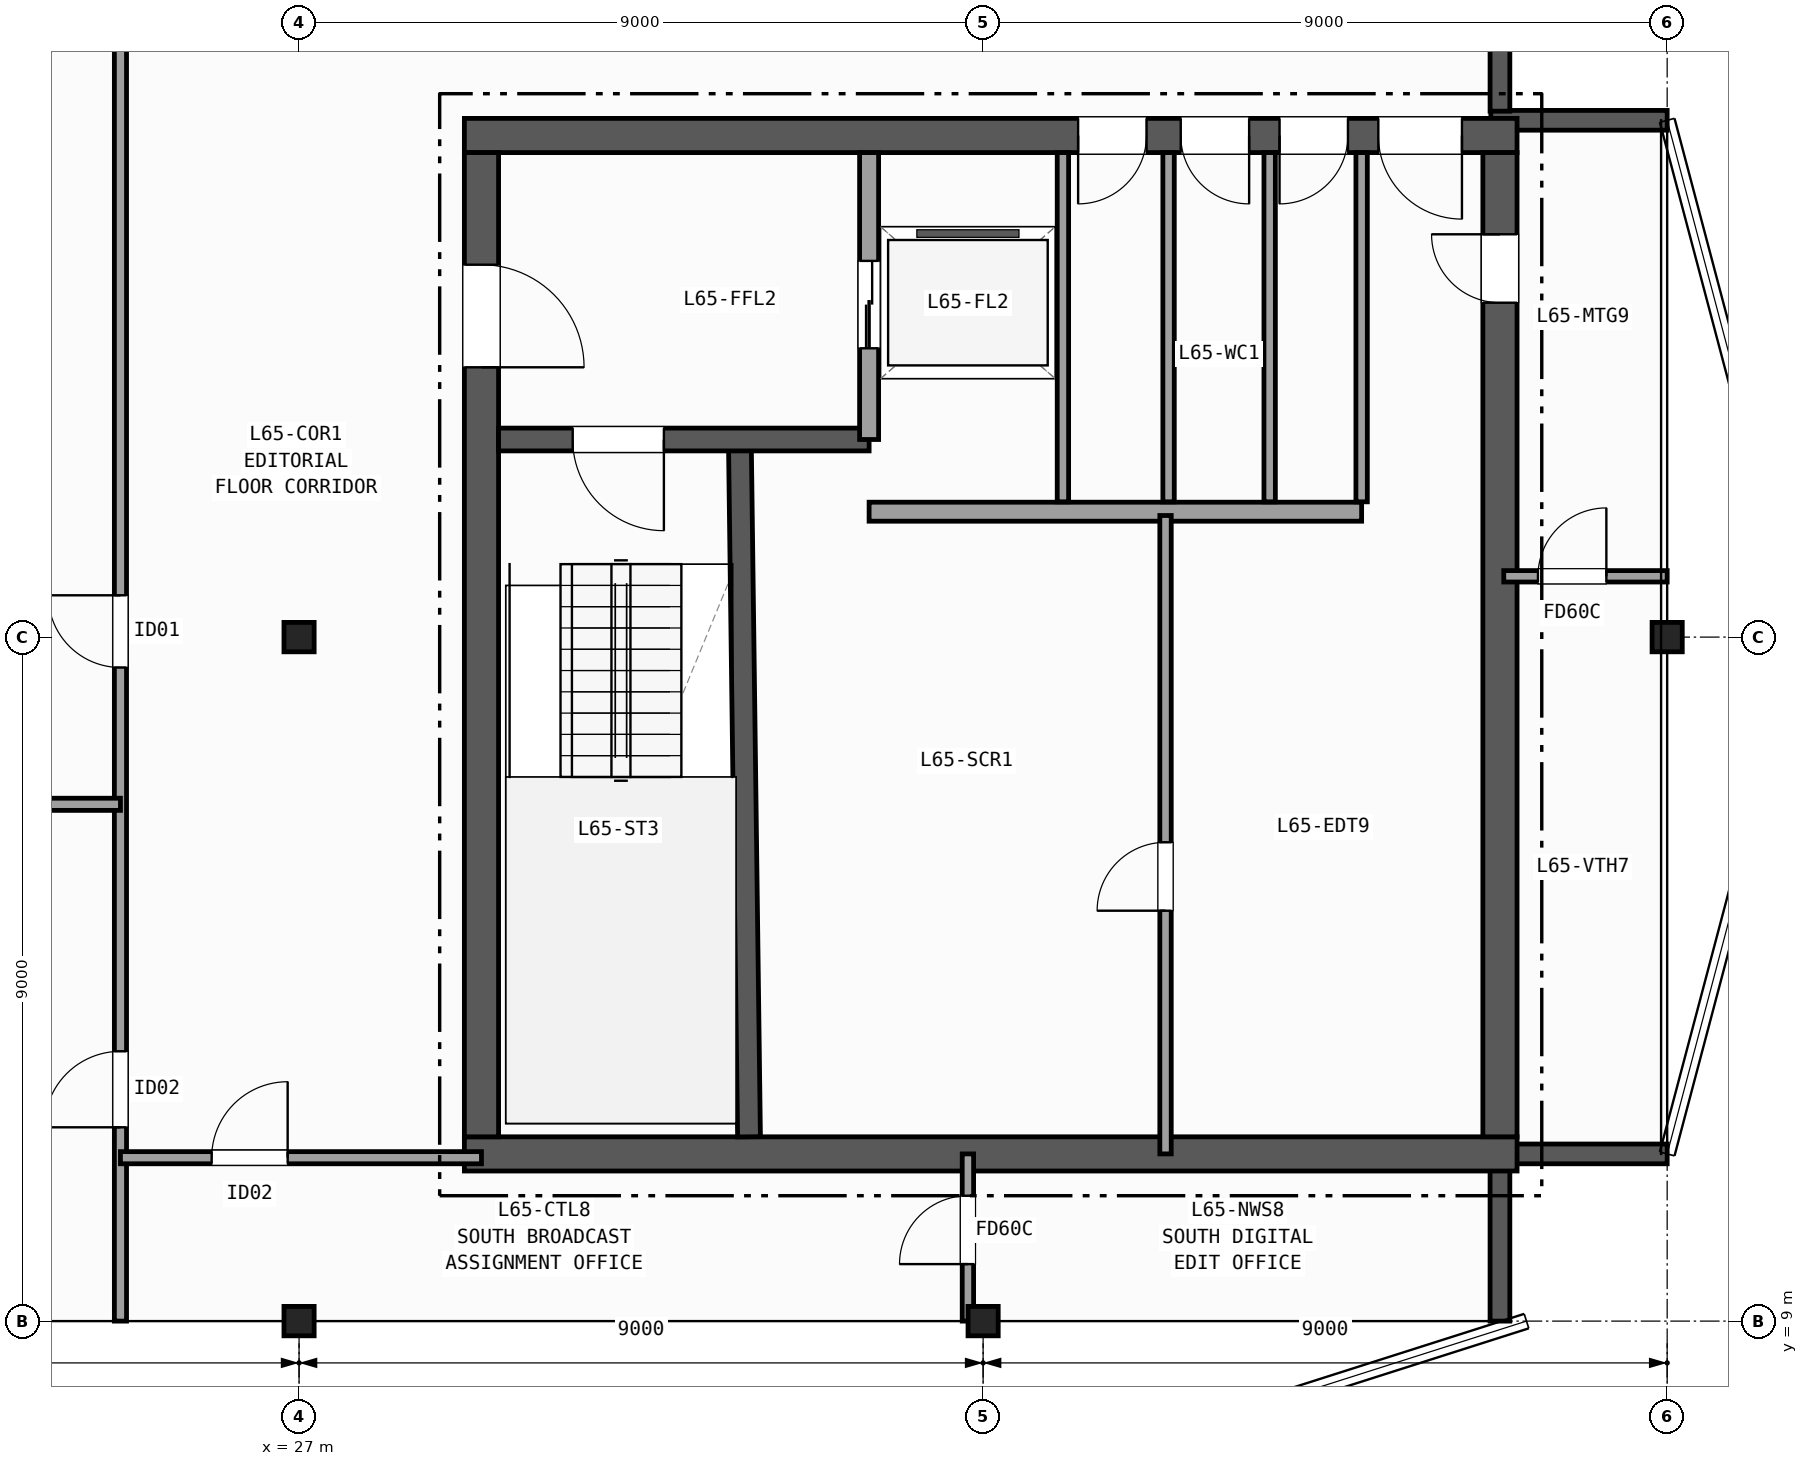
"""IFC4 building model, lengths in metres.
Left out: names, types, materials, properties, quantities, classifications, styles, units other than length and angle.
Written with IfcOpenShell. Run it as: python <this file> out.ifc"""

import sys

from ifc_helpers import new_model, si_unit, direction, frame, frame_2d, origin, origin_2d, place, context, subcontext, project, spatial, rectangle, i_section, extrude, element, fill, save


model = new_model("IFC4")
c1 = context("Model", 3, precision=1e-05, world=origin(), true_north=direction((0.0, 1.0)))
c2 = subcontext(c1, "Body", "Model", "MODEL_VIEW")
j1 = project(units=[si_unit("LENGTHUNIT", "METRE"), si_unit("PLANEANGLEUNIT", "RADIAN")], contexts=[c1])
p1 = place(None, origin())
s1 = spatial("IfcSite", under=j1, at=p1, CompositionType="ELEMENT")
p2 = place(p1, origin())
s2 = spatial("IfcBuilding", under=s1, at=p2, CompositionType="ELEMENT")
p3 = place(p2, frame((0.0, 0.0, 259.3)))
s3 = spatial("IfcBuildingStorey", under=s2, at=p3, CompositionType="ELEMENT", Elevation=259.3)
for number, where, z_axis, x_axis in (
    (1, (27.0, 9.0, 0.0), (0.0, 0.0, 1.0), (1.0, 0.0, 0.0)),
    (2, (27.0, 18.0, 0.0), (0.0, 0.0, 1.0), (1.0, 0.0, 0.0)),
    (3, (36.0, 9.0, 0.0), (0.0, 0.0, 1.0), (1.0, 0.0, 0.0)),
    (4, (45.0, 18.0, 0.0), (0.0, 0.0, 1.0), (1.0, 0.0, 0.0)),
):
    element("IfcColumn", number, at=place(p3, frame(where, z_axis=z_axis, x_axis=x_axis)), inside=s3, PredefinedType="COLUMN", context=c2, shape_type="SweptSolid", body=[
        extrude(i_section(OverallWidth=0.397, OverallDepth=0.387, WebThickness=0.021, FlangeThickness=0.033, FilletRadius=0.015, at=origin_2d()), origin(), (0.0, 0.0, 1.0), 3.7),
    ])
p4 = place(p3, frame((42.8, 9.0, 0.0), z_axis=(0.0, 0.0, 1.0), x_axis=(0.0, 1.0, 0.0)))
e5 = element("IfcWall", 5, at=p4, inside=s3, PredefinedType="SOLIDWALL", context=c2, shape_type="SweptSolid", body=[
    extrude(rectangle(XDim=2.08, YDim=0.26, at=frame_2d((1.04, 0.0))), origin(), (0.0, 0.0, 1.0), 3.42),
])
for number, where, z_axis, x_axis in (
    (6, (42.68, 11.2, 0.0), (0.0, 0.0, 1.0), (1.0, 0.0, 0.0)),
    (7, (45.0, 24.8, 0.0), (0.0, 0.0, 1.0), (-1.0, 0.0, 0.0)),
):
    element("IfcWall", number, at=place(p3, frame(where, z_axis=z_axis, x_axis=x_axis)), inside=s3, PredefinedType="SOLIDWALL", context=c2, shape_type="SweptSolid", body=[
        extrude(rectangle(XDim=2.32, YDim=0.26, at=frame_2d((1.16, 0.0))), origin(), (0.0, 0.0, 1.0), 3.42),
    ])
p5 = place(p3, frame((42.8, 24.92, 0.0), z_axis=(0.0, 0.0, 1.0), x_axis=(0.0, 1.0, 0.0)))
e8 = element("IfcWall", 8, at=p5, inside=s3, PredefinedType="SOLIDWALL", context=c2, shape_type="SweptSolid", body=[
    extrude(rectangle(XDim=2.08, YDim=0.26, at=frame_2d((1.04, 0.0))), origin(), (0.0, 0.0, 1.0), 3.42),
])
p6 = place(p3, frame((29.175, 11.2, 0.0), z_axis=(0.0, 0.0, 1.0), x_axis=(1.0, 0.0, 0.0)))
e9 = element("IfcWall", 9, at=p6, inside=s3, PredefinedType="SHEAR", context=c2, shape_type="SweptSolid", body=[
    extrude(rectangle(XDim=13.85, YDim=0.45, at=frame_2d((6.925, 0.0))), origin(), (0.0, 0.0, 1.0), 3.42),
])
p7 = place(p3, frame((43.025, 24.6, 0.0), z_axis=(0.0, 0.0, 1.0), x_axis=(-1.0, 0.0, 0.0)))
e10 = element("IfcWall", 10, at=p7, inside=s3, PredefinedType="SHEAR", context=c2, shape_type="SweptSolid", body=[
    extrude(rectangle(XDim=13.85, YDim=0.45, at=frame_2d((6.925, 0.0))), origin(), (0.0, 0.0, 1.0), 3.42),
])
p8 = place(p7, frame((0.725, 0.0, 0.0)))
e11 = element("IfcOpeningElement", 11, at=p8, cuts=e10, PredefinedType="OPENING", context=c2, shape_type="SweptSolid", body=[
    extrude(rectangle(XDim=1.1, YDim=2.15, at=frame_2d((0.55, 1.075))), frame((0.0, 0.235, 0.0), z_axis=(0.0, -1.0, 0.0), x_axis=(1.0, 0.0, 0.0)), (0.0, 0.0, 1.0), 0.47),
])
p9 = place(p7, frame((2.225, 0.0, 0.0)))
e12 = element("IfcOpeningElement", 12, at=p9, cuts=e10, PredefinedType="OPENING", context=c2, shape_type="SweptSolid", body=[
    extrude(rectangle(XDim=0.9, YDim=2.1, at=frame_2d((0.45, 1.05))), frame((0.0, 0.235, 0.0), z_axis=(0.0, -1.0, 0.0), x_axis=(1.0, 0.0, 0.0)), (0.0, 0.0, 1.0), 0.47),
])
p10 = place(p7, frame((3.525, 0.0, 0.0)))
e13 = element("IfcOpeningElement", 13, at=p10, cuts=e10, PredefinedType="OPENING", context=c2, shape_type="SweptSolid", body=[
    extrude(rectangle(XDim=0.9, YDim=2.1, at=frame_2d((0.45, 1.05))), frame((0.0, 0.235, 0.0), z_axis=(0.0, -1.0, 0.0), x_axis=(1.0, 0.0, 0.0)), (0.0, 0.0, 1.0), 0.47),
])
p11 = place(p7, frame((4.875, 0.0, 0.0)))
e14 = element("IfcOpeningElement", 14, at=p11, cuts=e10, PredefinedType="OPENING", context=c2, shape_type="SweptSolid", body=[
    extrude(rectangle(XDim=0.9, YDim=2.1, at=frame_2d((0.45, 1.05))), frame((0.0, 0.235, 0.0), z_axis=(0.0, -1.0, 0.0), x_axis=(1.0, 0.0, 0.0)), (0.0, 0.0, 1.0), 0.47),
])
p12 = place(p3, frame((29.4, 24.375, 0.0), z_axis=(0.0, 0.0, 1.0), x_axis=(0.0, -1.0, 0.0)))
e15 = element("IfcWall", 15, at=p12, inside=s3, PredefinedType="SHEAR", context=c2, shape_type="SweptSolid", body=[
    extrude(rectangle(XDim=12.95, YDim=0.45, at=frame_2d((6.475, 0.0))), origin(), (0.0, 0.0, 1.0), 3.42),
])
p13 = place(p12, frame((1.475, 0.0, 0.0)))
e16 = element("IfcOpeningElement", 16, at=p13, cuts=e15, PredefinedType="OPENING", context=c2, shape_type="SweptSolid", body=[
    extrude(rectangle(XDim=1.35, YDim=2.15, at=frame_2d((0.675, 1.075))), frame((0.0, 0.235, 0.0), z_axis=(0.0, -1.0, 0.0), x_axis=(1.0, 0.0, 0.0)), (0.0, 0.0, 1.0), 0.47),
])
p14 = place(p3, frame((42.8, 11.425, 0.0), z_axis=(0.0, 0.0, 1.0), x_axis=(0.0, 1.0, 0.0)))
e17 = element("IfcWall", 17, at=p14, inside=s3, PredefinedType="SHEAR", context=c2, shape_type="SweptSolid", body=[
    extrude(rectangle(XDim=12.95, YDim=0.45, at=frame_2d((6.475, 0.0))), origin(), (0.0, 0.0, 1.0), 3.42),
])
p15 = place(p14, frame((10.975, 0.0, 0.0)))
e18 = element("IfcOpeningElement", 18, at=p15, cuts=e17, PredefinedType="OPENING", context=c2, shape_type="SweptSolid", body=[
    extrude(rectangle(XDim=0.9, YDim=2.1, at=frame_2d((0.45, 1.05))), frame((0.0, 0.235, 0.0), z_axis=(0.0, -1.0, 0.0), x_axis=(1.0, 0.0, 0.0)), (0.0, 0.0, 1.0), 0.47),
])
p16 = place(p3, frame((32.92, 11.425, 0.0), z_axis=(0.0, 0.0, 1.0), x_axis=(-0.013135638869, 0.999913723774, 0.0)))
e19 = element("IfcWall", 19, at=p16, inside=s3, PredefinedType="SHEAR", context=c2, shape_type="SweptSolid", body=[
    extrude(rectangle(XDim=9.126, YDim=0.3, at=frame_2d((4.563, 0.0))), origin(), (0.0, 0.0, 1.0), 3.42),
])
p17 = place(p3, frame((34.5, 20.6, 0.0), z_axis=(0.0, 0.0, 1.0), x_axis=(-1.0, 0.0, 0.0)))
e20 = element("IfcWall", 20, at=p17, inside=s3, PredefinedType="SHEAR", context=c2, shape_type="SweptSolid", body=[
    extrude(rectangle(XDim=4.875, YDim=0.3, at=frame_2d((2.438, 0.0))), origin(), (0.0, 0.0, 1.0), 3.42),
])
p18 = place(p17, frame((2.7, 0.0, 0.0)))
e21 = element("IfcOpeningElement", 21, at=p18, cuts=e20, PredefinedType="OPENING", context=c2, shape_type="SweptSolid", body=[
    extrude(rectangle(XDim=1.2, YDim=2.15, at=frame_2d((0.6, 1.075))), frame((0.0, 0.16, 0.0), z_axis=(0.0, -1.0, 0.0), x_axis=(1.0, 0.0, 0.0)), (0.0, 0.0, 1.0), 0.32),
])
p19 = place(p3, frame((34.5, 20.6, 0.0), z_axis=(0.0, 0.0, 1.0), x_axis=(0.0, 1.0, 0.0)))
e22 = element("IfcWall", 22, at=p19, inside=s3, PredefinedType="PARTITIONING", context=c2, shape_type="SweptSolid", body=[
    extrude(rectangle(XDim=3.775, YDim=0.25, at=frame_2d((1.887, 0.0))), origin(), (0.0, 0.0, 1.0), 3.42),
])
p20 = place(p19, frame((1.2, 0.0, 0.0)))
e23 = element("IfcOpeningElement", 23, at=p20, cuts=e22, PredefinedType="OPENING", context=c2, shape_type="SweptSolid", body=[
    extrude(rectangle(XDim=1.15, YDim=2.15, at=frame_2d((0.575, 1.075))), frame((0.0, 0.135, 0.0), z_axis=(0.0, -1.0, 0.0), x_axis=(1.0, 0.0, 0.0)), (0.0, 0.0, 1.0), 0.27),
])
p21 = place(p3, frame((34.5, 19.65, 0.0), z_axis=(0.0, 0.0, 1.0), x_axis=(1.0, 0.0, 0.0)))
e24 = element("IfcWall", 24, at=p21, inside=s3, PredefinedType="PARTITIONING", context=c2, shape_type="SweptSolid", body=[
    extrude(rectangle(XDim=6.48, YDim=0.25, at=frame_2d((3.24, 0.0))), origin(), (0.0, 0.0, 1.0), 3.42),
])
p22 = place(p3, frame((38.4, 11.2, 0.0), z_axis=(0.0, 0.0, 1.0), x_axis=(0.0, 1.0, 0.0)))
e25 = element("IfcWall", 25, at=p22, inside=s3, PredefinedType="PARTITIONING", context=c2, shape_type="SweptSolid", body=[
    extrude(rectangle(XDim=8.4, YDim=0.15, at=frame_2d((4.2, 0.0))), origin(), (0.0, 0.0, 1.0), 3.42),
])
p23 = place(p22, frame((3.2, 0.0, 0.0)))
e26 = element("IfcOpeningElement", 26, at=p23, cuts=e25, PredefinedType="OPENING", context=c2, shape_type="SweptSolid", body=[
    extrude(rectangle(XDim=0.9, YDim=2.1, at=frame_2d((0.45, 1.05))), frame((0.0, 0.085, 0.0), z_axis=(0.0, -1.0, 0.0), x_axis=(1.0, 0.0, 0.0)), (0.0, 0.0, 1.0), 0.17),
])
for number, where, z_axis, x_axis in (
    (27, (37.05, 19.78, 0.0), (0.0, 0.0, 1.0), (0.0, 1.0, 0.0)),
    (28, (38.44, 19.78, 0.0), (0.0, 0.0, 1.0), (0.0, 1.0, 0.0)),
    (29, (39.77, 19.78, 0.0), (0.0, 0.0, 1.0), (0.0, 1.0, 0.0)),
    (30, (40.98, 19.78, 0.0), (0.0, 0.0, 1.0), (0.0, 1.0, 0.0)),
):
    element("IfcWall", number, at=place(p3, frame(where, z_axis=z_axis, x_axis=x_axis)), inside=s3, PredefinedType="PARTITIONING", context=c2, shape_type="SweptSolid", body=[
        extrude(rectangle(XDim=4.595, YDim=0.15, at=frame_2d((2.297, 0.0))), origin(), (0.0, 0.0, 1.0), 3.42),
    ])
p24 = place(p3, frame((24.65, 9.0, 0.0), z_axis=(0.0, 0.0, 1.0), x_axis=(0.0, 1.0, 0.0)))
e31 = element("IfcWall", 31, at=p24, inside=s3, PredefinedType="PARTITIONING", context=c2, shape_type="SweptSolid", body=[
    extrude(rectangle(XDim=19.2, YDim=0.16, at=frame_2d((9.6, 0.0))), origin(), (0.0, 0.0, 1.0), 2.707),
])
p25 = place(p24, frame((8.6, 0.0, 0.0)))
e32 = element("IfcOpeningElement", 32, at=p25, cuts=e31, PredefinedType="OPENING", context=c2, shape_type="SweptSolid", body=[
    extrude(rectangle(XDim=0.95, YDim=2.1, at=frame_2d((0.475, 1.05))), frame((0.0, 0.09, 0.0), z_axis=(0.0, -1.0, 0.0), x_axis=(1.0, 0.0, 0.0)), (0.0, 0.0, 1.0), 0.18),
])
p26 = place(p24, frame((2.55, 0.0, 0.0)))
e33 = element("IfcOpeningElement", 33, at=p26, cuts=e31, PredefinedType="OPENING", context=c2, shape_type="SweptSolid", body=[
    extrude(rectangle(XDim=1.0, YDim=2.1, at=frame_2d((0.5, 1.05))), frame((0.0, 0.09, 0.0), z_axis=(0.0, -1.0, 0.0), x_axis=(1.0, 0.0, 0.0)), (0.0, 0.0, 1.0), 0.18),
])
p27 = place(p3, frame((18.0, 15.8, 0.0), z_axis=(0.0, 0.0, 1.0), x_axis=(1.0, 0.0, 0.0)))
e34 = element("IfcWall", 34, at=p27, inside=s3, PredefinedType="PARTITIONING", context=c2, shape_type="SweptSolid", body=[
    extrude(rectangle(XDim=6.65, YDim=0.16, at=frame_2d((3.325, 0.0))), origin(), (0.0, 0.0, 1.0), 2.789),
])
p28 = place(p3, frame((24.65, 11.15, 0.0), z_axis=(0.0, 0.0, 1.0), x_axis=(1.0, 0.0, 0.0)))
e35 = element("IfcWall", 35, at=p28, inside=s3, PredefinedType="PARTITIONING", context=c2, shape_type="SweptSolid", body=[
    extrude(rectangle(XDim=4.75, YDim=0.16, at=frame_2d((2.375, 0.0))), origin(), (0.0, 0.0, 1.0), 2.792),
])
p29 = place(p28, frame((1.2, 0.0, 0.0)))
e36 = element("IfcOpeningElement", 36, at=p29, cuts=e35, PredefinedType="OPENING", context=c2, shape_type="SweptSolid", body=[
    extrude(rectangle(XDim=1.0, YDim=2.1, at=frame_2d((0.5, 1.05))), frame((0.0, 0.09, 0.0), z_axis=(0.0, -1.0, 0.0), x_axis=(1.0, 0.0, 0.0)), (0.0, 0.0, 1.0), 0.18),
])
p30 = place(p3, frame((35.8, 9.0, 0.0), z_axis=(0.0, 0.0, 1.0), x_axis=(0.0, 1.0, 0.0)))
e37 = element("IfcWall", 37, at=p30, inside=s3, PredefinedType="PARTITIONING", context=c2, shape_type="SweptSolid", body=[
    extrude(rectangle(XDim=2.2, YDim=0.15, at=frame_2d((1.1, 0.0))), origin(), (0.0, 0.0, 1.0), 2.707),
])
p31 = place(p30, frame((0.75, 0.0, 0.0)))
e38 = element("IfcOpeningElement", 38, at=p31, cuts=e37, PredefinedType="OPENING", context=c2, shape_type="SweptSolid", body=[
    extrude(rectangle(XDim=0.9, YDim=2.1, at=frame_2d((0.45, 1.05))), frame((0.0, 0.085, 0.0), z_axis=(0.0, -1.0, 0.0), x_axis=(1.0, 0.0, 0.0)), (0.0, 0.0, 1.0), 0.17),
])
p32 = place(p3, frame((42.85, 18.8, 0.0), z_axis=(0.0, 0.0, 1.0), x_axis=(1.0, 0.0, 0.0)))
e39 = element("IfcWall", 39, at=p32, inside=s3, PredefinedType="PARTITIONING", context=c2, shape_type="SweptSolid", body=[
    extrude(rectangle(XDim=2.15, YDim=0.15, at=frame_2d((1.075, 0.0))), origin(), (0.0, 0.0, 1.0), 3.42),
])
p33 = place(p32, frame((0.45, 0.0, 0.0)))
e40 = element("IfcOpeningElement", 40, at=p33, cuts=e39, PredefinedType="OPENING", context=c2, shape_type="SweptSolid", body=[
    extrude(rectangle(XDim=0.9, YDim=2.1, at=frame_2d((0.45, 1.05))), frame((0.0, 0.085, 0.0), z_axis=(0.0, -1.0, 0.0), x_axis=(1.0, 0.0, 0.0)), (0.0, 0.0, 1.0), 0.17),
])
p34 = place(p18, origin())
e41 = element("IfcDoor", 41, at=p34, inside=s3, OperationType="SINGLE_SWING_LEFT", PredefinedType="DOOR", context=c2, shape_type="SweptSolid", body=[
    extrude(rectangle(XDim=1.2, YDim=2.15, at=frame_2d((0.6, 1.075))), frame((0.0, 0.025, 0.0), z_axis=(0.0, -1.0, 0.0), x_axis=(1.0, 0.0, 0.0)), (0.0, 0.0, 1.0), 0.05),
])
fill(e21, e41)
p35 = place(p13, origin())
e42 = element("IfcDoor", 42, at=p35, inside=s3, OperationType="SINGLE_SWING_RIGHT", PredefinedType="DOOR", context=c2, shape_type="SweptSolid", body=[
    extrude(rectangle(XDim=1.35, YDim=2.15, at=frame_2d((0.675, 1.075))), frame((0.0, 0.025, 0.0), z_axis=(0.0, -1.0, 0.0), x_axis=(1.0, 0.0, 0.0)), (0.0, 0.0, 1.0), 0.05),
])
fill(e16, e42)
p36 = place(p15, origin())
e43 = element("IfcDoor", 43, at=p36, inside=s3, OperationType="SINGLE_SWING_RIGHT", PredefinedType="DOOR", context=c2, shape_type="SweptSolid", body=[
    extrude(rectangle(XDim=0.9, YDim=2.1, at=frame_2d((0.45, 1.05))), frame((0.0, 0.025, 0.0), z_axis=(0.0, -1.0, 0.0), x_axis=(1.0, 0.0, 0.0)), (0.0, 0.0, 1.0), 0.05),
])
fill(e18, e43)
p37 = place(p8, origin())
e44 = element("IfcDoor", 44, at=p37, inside=s3, OperationType="SINGLE_SWING_LEFT", PredefinedType="DOOR", context=c2, shape_type="SweptSolid", body=[
    extrude(rectangle(XDim=1.1, YDim=2.15, at=frame_2d((0.55, 1.075))), frame((0.0, 0.025, 0.0), z_axis=(0.0, -1.0, 0.0), x_axis=(1.0, 0.0, 0.0)), (0.0, 0.0, 1.0), 0.05),
])
fill(e11, e44)
p38 = place(p9, origin())
e45 = element("IfcDoor", 45, at=p38, inside=s3, OperationType="SINGLE_SWING_RIGHT", PredefinedType="DOOR", context=c2, shape_type="SweptSolid", body=[
    extrude(rectangle(XDim=0.9, YDim=2.1, at=frame_2d((0.45, 1.05))), frame((0.0, 0.025, 0.0), z_axis=(0.0, -1.0, 0.0), x_axis=(1.0, 0.0, 0.0)), (0.0, 0.0, 1.0), 0.05),
])
fill(e12, e45)
p39 = place(p10, origin())
e46 = element("IfcDoor", 46, at=p39, inside=s3, OperationType="SINGLE_SWING_LEFT", PredefinedType="DOOR", context=c2, shape_type="SweptSolid", body=[
    extrude(rectangle(XDim=0.9, YDim=2.1, at=frame_2d((0.45, 1.05))), frame((0.0, 0.025, 0.0), z_axis=(0.0, -1.0, 0.0), x_axis=(1.0, 0.0, 0.0)), (0.0, 0.0, 1.0), 0.05),
])
fill(e13, e46)
p40 = place(p11, origin())
e47 = element("IfcDoor", 47, at=p40, inside=s3, OperationType="SINGLE_SWING_RIGHT", PredefinedType="DOOR", context=c2, shape_type="SweptSolid", body=[
    extrude(rectangle(XDim=0.9, YDim=2.1, at=frame_2d((0.45, 1.05))), frame((0.0, 0.025, 0.0), z_axis=(0.0, -1.0, 0.0), x_axis=(1.0, 0.0, 0.0)), (0.0, 0.0, 1.0), 0.05),
])
fill(e14, e47)
p41 = place(p20, origin())
e48 = element("IfcDoor", 48, at=p41, inside=s3, OperationType="DOUBLE_DOOR_SLIDING", PredefinedType="DOOR", context=c2, shape_type="SweptSolid", body=[
    extrude(rectangle(XDim=1.15, YDim=2.15, at=frame_2d((0.575, 1.075))), frame((0.0, 0.025, 0.0), z_axis=(0.0, -1.0, 0.0), x_axis=(1.0, 0.0, 0.0)), (0.0, 0.0, 1.0), 0.05),
])
fill(e23, e48)
p42 = place(p23, origin())
e49 = element("IfcDoor", 49, at=p42, inside=s3, OperationType="SINGLE_SWING_LEFT", PredefinedType="DOOR", context=c2, shape_type="SweptSolid", body=[
    extrude(rectangle(XDim=0.9, YDim=2.1, at=frame_2d((0.45, 1.05))), frame((0.0, 0.025, 0.0), z_axis=(0.0, -1.0, 0.0), x_axis=(1.0, 0.0, 0.0)), (0.0, 0.0, 1.0), 0.05),
])
fill(e26, e49)
p43 = place(p25, origin())
e50 = element("IfcDoor", 50, at=p43, inside=s3, OperationType="SINGLE_SWING_RIGHT", PredefinedType="DOOR", context=c2, shape_type="SweptSolid", body=[
    extrude(rectangle(XDim=0.95, YDim=2.1, at=frame_2d((0.475, 1.05))), frame((0.0, 0.025, 0.0), z_axis=(0.0, -1.0, 0.0), x_axis=(1.0, 0.0, 0.0)), (0.0, 0.0, 1.0), 0.05),
])
fill(e32, e50)
p44 = place(p26, origin())
e51 = element("IfcDoor", 51, at=p44, inside=s3, OperationType="SINGLE_SWING_LEFT", PredefinedType="DOOR", context=c2, shape_type="SweptSolid", body=[
    extrude(rectangle(XDim=1.0, YDim=2.1, at=frame_2d((0.5, 1.05))), frame((0.0, 0.025, 0.0), z_axis=(0.0, -1.0, 0.0), x_axis=(1.0, 0.0, 0.0)), (0.0, 0.0, 1.0), 0.05),
])
fill(e33, e51)
p45 = place(p29, origin())
e52 = element("IfcDoor", 52, at=p45, inside=s3, OperationType="SINGLE_SWING_RIGHT", PredefinedType="DOOR", context=c2, shape_type="SweptSolid", body=[
    extrude(rectangle(XDim=1.0, YDim=2.1, at=frame_2d((0.5, 1.05))), frame((0.0, 0.025, 0.0), z_axis=(0.0, -1.0, 0.0), x_axis=(1.0, 0.0, 0.0)), (0.0, 0.0, 1.0), 0.05),
])
fill(e36, e52)
p46 = place(p31, origin())
e53 = element("IfcDoor", 53, at=p46, inside=s3, OperationType="SINGLE_SWING_LEFT", PredefinedType="DOOR", context=c2, shape_type="SweptSolid", body=[
    extrude(rectangle(XDim=0.9, YDim=2.1, at=frame_2d((0.45, 1.05))), frame((0.0, 0.025, 0.0), z_axis=(0.0, -1.0, 0.0), x_axis=(1.0, 0.0, 0.0)), (0.0, 0.0, 1.0), 0.05),
])
fill(e38, e53)
p47 = place(p33, origin())
e54 = element("IfcDoor", 54, at=p47, inside=s3, OperationType="SINGLE_SWING_RIGHT", PredefinedType="DOOR", context=c2, shape_type="SweptSolid", body=[
    extrude(rectangle(XDim=0.9, YDim=2.1, at=frame_2d((0.45, 1.05))), frame((0.0, 0.025, 0.0), z_axis=(0.0, -1.0, 0.0), x_axis=(1.0, 0.0, 0.0)), (0.0, 0.0, 1.0), 0.05),
])
fill(e40, e54)
save(model, sys.argv[1])
